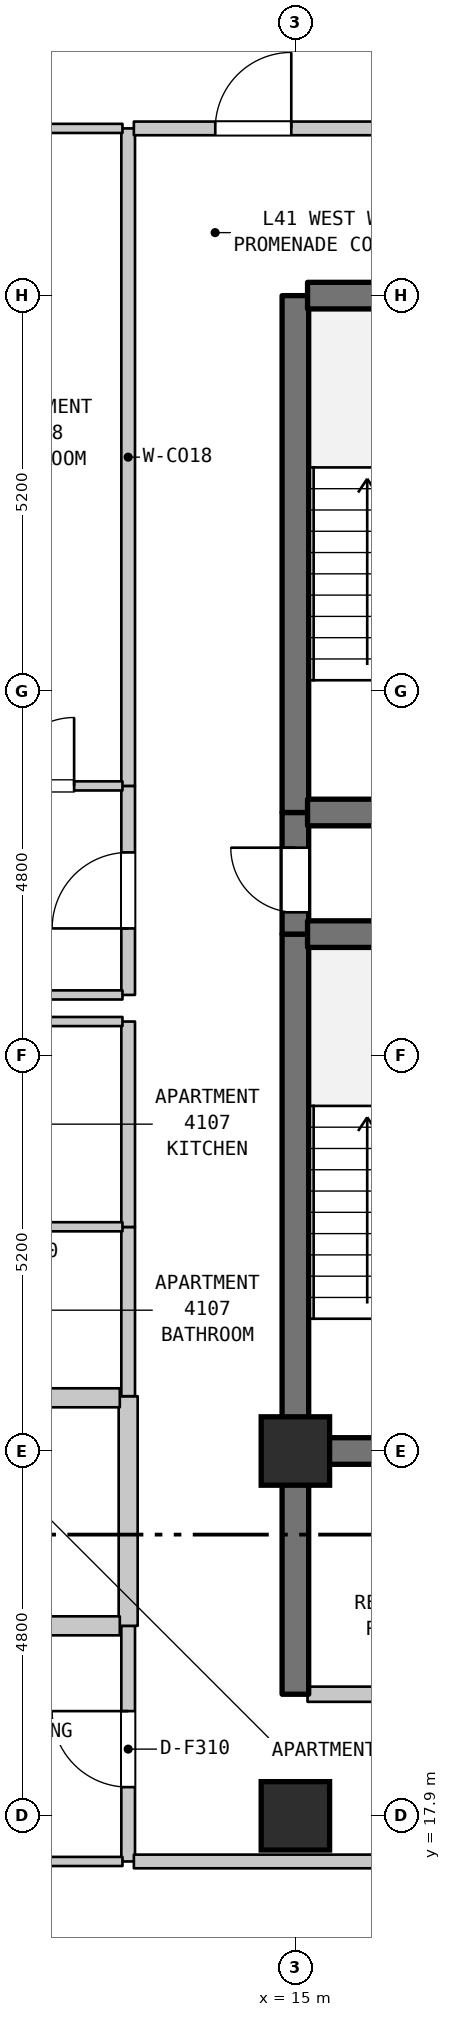
"""IFC4 building model, lengths in metres.
Left out: names, types, materials, properties, quantities, classifications, styles, units other than length and angle.
Written with IfcOpenShell. Run it as: python <this file> out.ifc"""

import sys

from ifc_helpers import new_model, si_unit, direction, frame, frame_2d, origin, origin_2d, place, context, subcontext, project, spatial, rectangle, extrude, element, fill, save


model = new_model("IFC4")
c1 = context("Model", 3, precision=1e-05, world=origin(), true_north=direction((0.0, 1.0)))
c2 = subcontext(c1, "Body", "Model", "MODEL_VIEW")
j1 = project(units=[si_unit("LENGTHUNIT", "METRE"), si_unit("PLANEANGLEUNIT", "RADIAN")], contexts=[c1])
p1 = place(None, origin())
s1 = spatial("IfcSite", under=j1, at=p1, CompositionType="ELEMENT")
p2 = place(p1, origin())
s2 = spatial("IfcBuilding", under=s1, at=p2, CompositionType="ELEMENT")
p3 = place(p2, frame((0.0, 0.0, 169.1)))
s3 = spatial("IfcBuildingStorey", under=s2, at=p3, CompositionType="ELEMENT", Elevation=169.1)
for number, where, z_axis, x_axis in (
    (1, (15.0, 17.9, 0.0), (0.0, 0.0, 1.0), (1.0, 0.0, 0.0)),
    (2, (15.0, 22.7, 0.0), (0.0, 0.0, 1.0), (1.0, 0.0, 0.0)),
):
    element("IfcColumn", number, at=place(p3, frame(where, z_axis=z_axis, x_axis=x_axis)), inside=s3, PredefinedType="COLUMN", context=c2, shape_type="SweptSolid", body=[
        extrude(rectangle(XDim=0.9, YDim=0.9, at=origin_2d()), origin(), (0.0, 0.0, 1.0), 3.7),
    ])
p4 = place(p3, frame((12.8, 17.3, 0.0), z_axis=(0.0, 0.0, 1.0), x_axis=(0.0, 1.0, 0.0)))
e3 = element("IfcWall", 3, at=p4, inside=s3, PredefinedType="STANDARD", context=c2, shape_type="SweptSolid", body=[
    extrude(rectangle(XDim=3.1, YDim=0.18, at=frame_2d((1.55, 0.0))), origin(), (0.0, 0.0, 1.0), 3.39),
])
p5 = place(p4, frame((0.978, 0.0, 0.0)))
e4 = element("IfcOpeningElement", 4, at=p5, cuts=e3, PredefinedType="OPENING", context=c2, shape_type="SweptSolid", body=[
    extrude(rectangle(XDim=1.0, YDim=2.15, at=frame_2d((0.5, 1.075))), frame((0.0, 0.1, 0.0), z_axis=(0.0, -1.0, 0.0), x_axis=(1.0, 0.0, 0.0)), (0.0, 0.0, 1.0), 0.2),
])
p6 = place(p3, frame((12.8, 20.4, 0.0), z_axis=(0.0, 0.0, 1.0), x_axis=(0.0, 1.0, 0.0)))
e5 = element("IfcWall", 5, at=p6, inside=s3, PredefinedType="STANDARD", context=c2, shape_type="SweptSolid", body=[
    extrude(rectangle(XDim=3.021, YDim=0.25, at=frame_2d((1.51, 0.0))), origin(), (0.0, 0.0, 1.0), 3.39),
])
p7 = place(p3, frame((12.8, 23.421, 0.0), z_axis=(0.0, 0.0, 1.0), x_axis=(0.0, 1.0, 0.0)))
e6 = element("IfcWall", 6, at=p7, inside=s3, PredefinedType="STANDARD", context=c2, shape_type="SweptSolid", body=[
    extrude(rectangle(XDim=2.226, YDim=0.18, at=frame_2d((1.113, 0.0))), origin(), (0.0, 0.0, 1.0), 3.39),
])
p8 = place(p3, frame((12.8, 25.647, 0.0), z_axis=(0.0, 0.0, 1.0), x_axis=(0.0, 1.0, 0.0)))
e7 = element("IfcWall", 7, at=p8, inside=s3, PredefinedType="STANDARD", context=c2, shape_type="SweptSolid", body=[
    extrude(rectangle(XDim=2.703, YDim=0.18, at=frame_2d((1.352, 0.0))), origin(), (0.0, 0.0, 1.0), 3.39),
])
p9 = place(p3, frame((12.8, 28.7, 0.0), z_axis=(0.0, 0.0, 1.0), x_axis=(0.0, 1.0, 0.0)))
e8 = element("IfcWall", 8, at=p9, inside=s3, PredefinedType="STANDARD", context=c2, shape_type="SweptSolid", body=[
    extrude(rectangle(XDim=2.75, YDim=0.18, at=frame_2d((1.375, 0.0))), origin(), (0.0, 0.0, 1.0), 3.39),
])
p10 = place(p9, frame((0.875, 0.0, 0.0)))
e9 = element("IfcOpeningElement", 9, at=p10, cuts=e8, PredefinedType="OPENING", context=c2, shape_type="SweptSolid", body=[
    extrude(rectangle(XDim=1.0, YDim=2.15, at=frame_2d((0.5, 1.075))), frame((0.0, 0.1, 0.0), z_axis=(0.0, -1.0, 0.0), x_axis=(1.0, 0.0, 0.0)), (0.0, 0.0, 1.0), 0.2),
])
p11 = place(p3, frame((12.8, 31.45, 0.0), z_axis=(0.0, 0.0, 1.0), x_axis=(0.0, 1.0, 0.0)))
e10 = element("IfcWall", 10, at=p11, inside=s3, PredefinedType="STANDARD", context=c2, shape_type="SweptSolid", body=[
    extrude(rectangle(XDim=8.65, YDim=0.18, at=frame_2d((4.325, 0.0))), origin(), (0.0, 0.0, 1.0), 3.39),
])
p12 = place(p3, frame((15.0, 19.5, 0.0), z_axis=(0.0, 0.0, 1.0), x_axis=(0.0, 1.0, 0.0)))
e11 = element("IfcWall", 11, at=p12, inside=s3, PredefinedType="SHEAR", context=c2, shape_type="SweptSolid", body=[
    extrude(rectangle(XDim=3.2, YDim=0.35, at=frame_2d((1.6, 0.0))), origin(), (0.0, 0.0, 1.0), 3.39),
])
p13 = place(p3, frame((15.0, 22.7, 0.0), z_axis=(0.0, 0.0, 1.0), x_axis=(0.0, 1.0, 0.0)))
e12 = element("IfcWall", 12, at=p13, inside=s3, PredefinedType="SHEAR", context=c2, shape_type="SweptSolid", body=[
    extrude(rectangle(XDim=6.8, YDim=0.35, at=frame_2d((3.4, 0.0))), origin(), (0.0, 0.0, 1.0), 3.39),
])
p14 = place(p3, frame((15.0, 29.5, 0.0), z_axis=(0.0, 0.0, 1.0), x_axis=(0.0, 1.0, 0.0)))
e13 = element("IfcWall", 13, at=p14, inside=s3, PredefinedType="SHEAR", context=c2, shape_type="SweptSolid", body=[
    extrude(rectangle(XDim=1.6, YDim=0.35, at=frame_2d((0.8, 0.0))), origin(), (0.0, 0.0, 1.0), 3.39),
])
p15 = place(p14, frame((0.287, 0.0, 0.0)))
e14 = element("IfcOpeningElement", 14, at=p15, cuts=e13, PredefinedType="OPENING", context=c2, shape_type="SweptSolid", body=[
    extrude(rectangle(XDim=0.85, YDim=2.1, at=frame_2d((0.425, 1.05))), frame((0.0, 0.185, 0.0), z_axis=(0.0, -1.0, 0.0), x_axis=(1.0, 0.0, 0.0)), (0.0, 0.0, 1.0), 0.37),
])
p16 = place(p3, frame((15.0, 31.1, 0.0), z_axis=(0.0, 0.0, 1.0), x_axis=(0.0, 1.0, 0.0)))
e15 = element("IfcWall", 15, at=p16, inside=s3, PredefinedType="SHEAR", context=c2, shape_type="SweptSolid", body=[
    extrude(rectangle(XDim=6.8, YDim=0.35, at=frame_2d((3.4, 0.0))), origin(), (0.0, 0.0, 1.0), 3.39),
])
p17 = place(p3, frame((9.085, 17.3, 0.0), z_axis=(0.0, 0.0, 1.0), x_axis=(1.0, 0.0, 0.0)))
e16 = element("IfcWall", 16, at=p17, inside=s3, PredefinedType="PARTITIONING", context=c2, shape_type="SweptSolid", body=[
    extrude(rectangle(XDim=3.64, YDim=0.12, at=frame_2d((1.82, 0.0))), origin(), (0.0, 0.0, 1.0), 3.39),
])
p18 = place(p3, frame((12.875, 17.3, 0.0), z_axis=(0.0, 0.0, 1.0), x_axis=(1.0, 0.0, 0.0)))
e17 = element("IfcWall", 17, at=p18, inside=s3, PredefinedType="STANDARD", context=c2, shape_type="SweptSolid", body=[
    extrude(rectangle(XDim=7.35, YDim=0.18, at=frame_2d((3.675, 0.0))), origin(), (0.0, 0.0, 1.0), 3.39),
])
p19 = place(p18, frame((3.16, 0.0, 0.0)))
e18 = element("IfcOpeningElement", 18, at=p19, cuts=e17, PredefinedType="OPENING", context=c2, shape_type="SweptSolid", body=[
    extrude(rectangle(XDim=1.0, YDim=2.15, at=frame_2d((0.5, 1.075))), frame((0.0, 0.1, 0.0), z_axis=(0.0, -1.0, 0.0), x_axis=(1.0, 0.0, 0.0)), (0.0, 0.0, 1.0), 0.2),
])
p20 = place(p3, frame((15.16, 19.5, 0.0), z_axis=(0.0, 0.0, 1.0), x_axis=(1.0, 0.0, 0.0)))
e19 = element("IfcWall", 19, at=p20, inside=s3, PredefinedType="STANDARD", context=c2, shape_type="SweptSolid", body=[
    extrude(rectangle(XDim=3.68, YDim=0.2, at=frame_2d((1.84, 0.0))), origin(), (0.0, 0.0, 1.0), 3.39),
])
p21 = place(p20, frame((1.39, 0.0, 0.0)))
e20 = element("IfcOpeningElement", 20, at=p21, cuts=e19, PredefinedType="OPENING", context=c2, shape_type="SweptSolid", body=[
    extrude(rectangle(XDim=0.9, YDim=2.15, at=frame_2d((0.45, 1.075))), frame((0.0, 0.11, 0.0), z_axis=(0.0, -1.0, 0.0), x_axis=(1.0, 0.0, 0.0)), (0.0, 0.0, 1.0), 0.22),
])
p22 = place(p3, frame((10.66, 20.4, 0.0), z_axis=(0.0, 0.0, 1.0), x_axis=(1.0, 0.0, 0.0)))
e21 = element("IfcWall", 21, at=p22, inside=s3, PredefinedType="STANDARD", context=c2, shape_type="SweptSolid", body=[
    extrude(rectangle(XDim=2.03, YDim=0.25, at=frame_2d((1.015, 0.0))), origin(), (0.0, 0.0, 1.0), 3.39),
])
p23 = place(p3, frame((15.16, 22.7, 0.0), z_axis=(0.0, 0.0, 1.0), x_axis=(1.0, 0.0, 0.0)))
e22 = element("IfcWall", 22, at=p23, inside=s3, PredefinedType="SHEAR", context=c2, shape_type="SweptSolid", body=[
    extrude(rectangle(XDim=3.68, YDim=0.35, at=frame_2d((1.84, 0.0))), origin(), (0.0, 0.0, 1.0), 3.39),
])
p24 = place(p3, frame((10.66, 23.4, 0.0), z_axis=(0.0, 0.0, 1.0), x_axis=(1.0, 0.0, 0.0)))
e23 = element("IfcWall", 23, at=p24, inside=s3, PredefinedType="STANDARD", context=c2, shape_type="SweptSolid", body=[
    extrude(rectangle(XDim=2.03, YDim=0.25, at=frame_2d((1.015, 0.0))), origin(), (0.0, 0.0, 1.0), 3.39),
])
for number, where, z_axis, x_axis in (
    (24, (10.595, 25.65, 0.0), (0.0, 0.0, 1.0), (1.0, 0.0, 0.0)),
    (25, (10.595, 28.35, 0.0), (0.0, 0.0, 1.0), (1.0, 0.0, 0.0)),
):
    element("IfcWall", number, at=place(p3, frame(where, z_axis=z_axis, x_axis=x_axis)), inside=s3, PredefinedType="PARTITIONING", context=c2, shape_type="SweptSolid", body=[
        extrude(rectangle(XDim=2.13, YDim=0.12, at=frame_2d((1.065, 0.0))), origin(), (0.0, 0.0, 1.0), 3.39),
    ])
p25 = place(p3, frame((9.03, 28.7, 0.0), z_axis=(0.0, 0.0, 1.0), x_axis=(1.0, 0.0, 0.0)))
e26 = element("IfcWall", 26, at=p25, inside=s3, PredefinedType="PARTITIONING", context=c2, shape_type="SweptSolid", body=[
    extrude(rectangle(XDim=3.695, YDim=0.12, at=frame_2d((1.848, 0.0))), origin(), (0.0, 0.0, 1.0), 3.39),
])
for number, where, z_axis, x_axis in (
    (27, (15.16, 29.5, 0.0), (0.0, 0.0, 1.0), (1.0, 0.0, 0.0)),
    (28, (15.16, 31.1, 0.0), (0.0, 0.0, 1.0), (1.0, 0.0, 0.0)),
):
    element("IfcWall", number, at=place(p3, frame(where, z_axis=z_axis, x_axis=x_axis)), inside=s3, PredefinedType="SHEAR", context=c2, shape_type="SweptSolid", body=[
        extrude(rectangle(XDim=3.68, YDim=0.35, at=frame_2d((1.84, 0.0))), origin(), (0.0, 0.0, 1.0), 3.39),
    ])
p26 = place(p3, frame((10.523, 31.45, 0.0), z_axis=(0.0, 0.0, 1.0), x_axis=(1.0, 0.0, 0.0)))
e29 = element("IfcWall", 29, at=p26, inside=s3, PredefinedType="PARTITIONING", context=c2, shape_type="SweptSolid", body=[
    extrude(rectangle(XDim=2.202, YDim=0.12, at=frame_2d((1.101, 0.0))), origin(), (0.0, 0.0, 1.0), 3.39),
])
p27 = place(p26, frame((0.666, 0.0, 0.0)))
e30 = element("IfcOpeningElement", 30, at=p27, cuts=e29, PredefinedType="OPENING", context=c2, shape_type="SweptSolid", body=[
    extrude(rectangle(XDim=0.9, YDim=2.1, at=frame_2d((0.45, 1.05))), frame((0.0, 0.07, 0.0), z_axis=(0.0, -1.0, 0.0), x_axis=(1.0, 0.0, 0.0)), (0.0, 0.0, 1.0), 0.14),
])
p28 = place(p3, frame((15.16, 37.9, 0.0), z_axis=(0.0, 0.0, 1.0), x_axis=(1.0, 0.0, 0.0)))
e31 = element("IfcWall", 31, at=p28, inside=s3, PredefinedType="SHEAR", context=c2, shape_type="SweptSolid", body=[
    extrude(rectangle(XDim=3.68, YDim=0.35, at=frame_2d((1.84, 0.0))), origin(), (0.0, 0.0, 1.0), 3.39),
])
p29 = place(p3, frame((10.523, 40.1, 0.0), z_axis=(0.0, 0.0, 1.0), x_axis=(1.0, 0.0, 0.0)))
e32 = element("IfcWall", 32, at=p29, inside=s3, PredefinedType="PARTITIONING", context=c2, shape_type="SweptSolid", body=[
    extrude(rectangle(XDim=2.202, YDim=0.12, at=frame_2d((1.101, 0.0))), origin(), (0.0, 0.0, 1.0), 3.39),
])
p30 = place(p3, frame((12.875, 40.1, 0.0), z_axis=(0.0, 0.0, 1.0), x_axis=(1.0, 0.0, 0.0)))
e33 = element("IfcWall", 33, at=p30, inside=s3, PredefinedType="STANDARD", context=c2, shape_type="SweptSolid", body=[
    extrude(rectangle(XDim=3.32, YDim=0.18, at=frame_2d((1.66, 0.0))), origin(), (0.0, 0.0, 1.0), 3.39),
])
p31 = place(p30, frame((1.071, 0.0, 0.0)))
e34 = element("IfcOpeningElement", 34, at=p31, cuts=e33, PredefinedType="OPENING", context=c2, shape_type="SweptSolid", body=[
    extrude(rectangle(XDim=1.0, YDim=2.15, at=frame_2d((0.5, 1.075))), frame((0.0, 0.1, 0.0), z_axis=(0.0, -1.0, 0.0), x_axis=(1.0, 0.0, 0.0)), (0.0, 0.0, 1.0), 0.2),
])
p32 = place(p5, origin())
e35 = element("IfcDoor", 35, at=p32, inside=s3, OperationType="SINGLE_SWING_RIGHT", PredefinedType="DOOR", context=c2, shape_type="SweptSolid", body=[
    extrude(rectangle(XDim=1.0, YDim=2.15, at=frame_2d((0.5, 1.075))), frame((0.0, 0.025, 0.0), z_axis=(0.0, -1.0, 0.0), x_axis=(1.0, 0.0, 0.0)), (0.0, 0.0, 1.0), 0.05),
])
fill(e4, e35)
p33 = place(p10, origin())
e36 = element("IfcDoor", 36, at=p33, inside=s3, OperationType="SINGLE_SWING_LEFT", PredefinedType="DOOR", context=c2, shape_type="SweptSolid", body=[
    extrude(rectangle(XDim=1.0, YDim=2.15, at=frame_2d((0.5, 1.075))), frame((0.0, 0.025, 0.0), z_axis=(0.0, -1.0, 0.0), x_axis=(1.0, 0.0, 0.0)), (0.0, 0.0, 1.0), 0.05),
])
fill(e9, e36)
p34 = place(p15, origin())
e37 = element("IfcDoor", 37, at=p34, inside=s3, OperationType="SINGLE_SWING_RIGHT", PredefinedType="DOOR", context=c2, shape_type="SweptSolid", body=[
    extrude(rectangle(XDim=0.85, YDim=2.1, at=frame_2d((0.425, 1.05))), frame((0.0, 0.025, 0.0), z_axis=(0.0, -1.0, 0.0), x_axis=(1.0, 0.0, 0.0)), (0.0, 0.0, 1.0), 0.05),
])
fill(e14, e37)
p35 = place(p27, origin())
e38 = element("IfcDoor", 38, at=p35, inside=s3, OperationType="SINGLE_SWING_RIGHT", PredefinedType="DOOR", context=c2, shape_type="SweptSolid", body=[
    extrude(rectangle(XDim=0.9, YDim=2.1, at=frame_2d((0.45, 1.05))), frame((0.0, 0.025, 0.0), z_axis=(0.0, -1.0, 0.0), x_axis=(1.0, 0.0, 0.0)), (0.0, 0.0, 1.0), 0.05),
])
fill(e30, e38)
p36 = place(p31, origin())
e39 = element("IfcDoor", 39, at=p36, inside=s3, OperationType="SINGLE_SWING_RIGHT", PredefinedType="DOOR", context=c2, shape_type="SweptSolid", body=[
    extrude(rectangle(XDim=1.0, YDim=2.15, at=frame_2d((0.5, 1.075))), frame((0.0, 0.025, 0.0), z_axis=(0.0, -1.0, 0.0), x_axis=(1.0, 0.0, 0.0)), (0.0, 0.0, 1.0), 0.05),
])
fill(e34, e39)
save(model, sys.argv[1])
